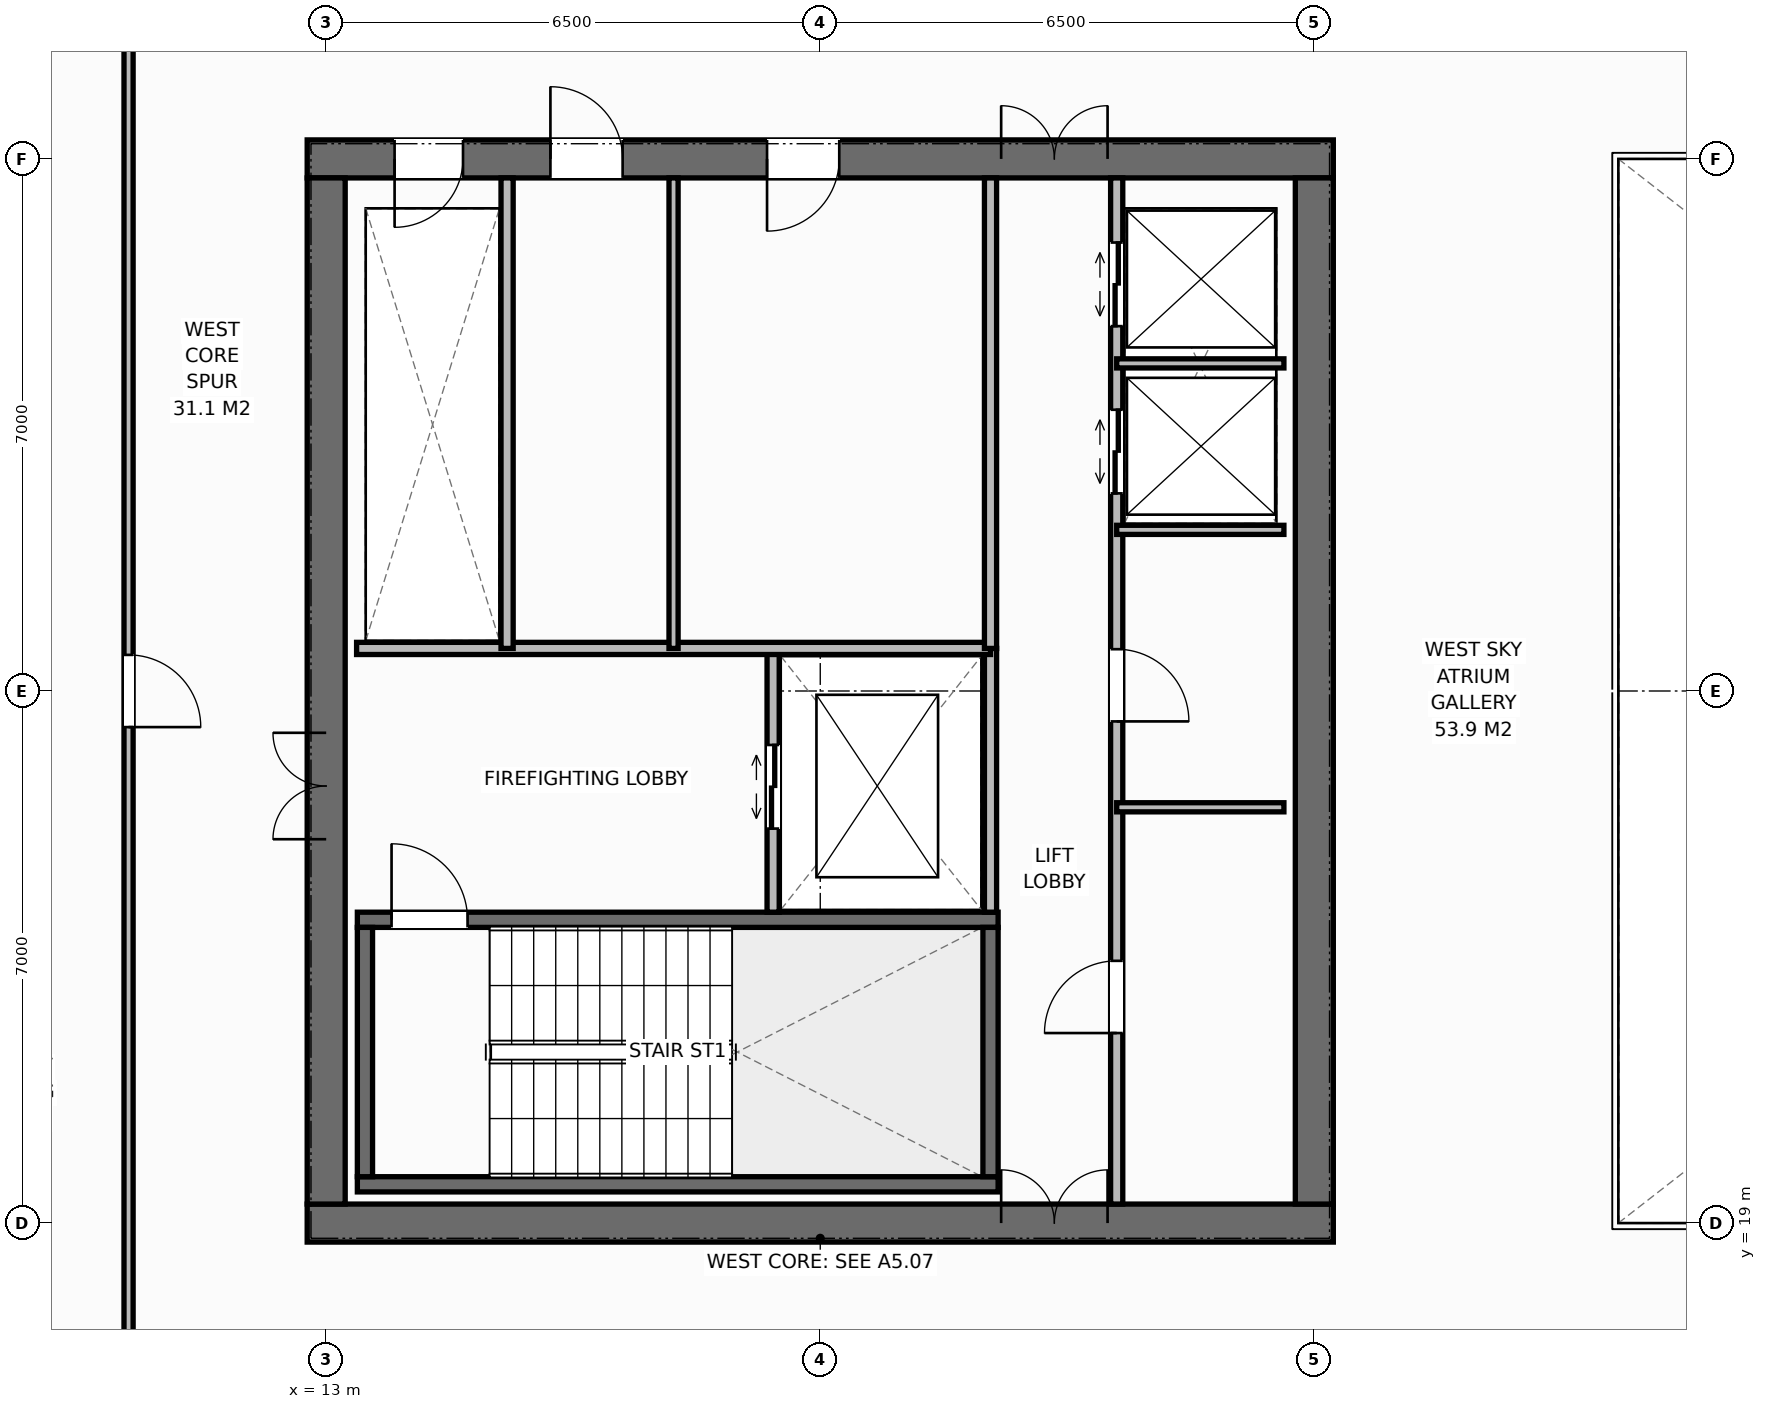
"""IFC4 building model, lengths in metres.
Left out: names, types, materials, properties, quantities, classifications, styles, units other than length and angle.
Written with IfcOpenShell. Run it as: python <this file> out.ifc"""

import sys

from ifc_helpers import new_model, si_unit, direction, frame, frame_2d, origin, place, context, subcontext, project, spatial, rectangle, extrude, element, fill, save


model = new_model("IFC4")
c1 = context("Model", 3, precision=1e-05, world=origin(), true_north=direction((0.0, 1.0)))
c2 = subcontext(c1, "Body", "Model", "MODEL_VIEW")
j1 = project(units=[si_unit("LENGTHUNIT", "METRE"), si_unit("PLANEANGLEUNIT", "RADIAN")], contexts=[c1])
p1 = place(None, origin())
s1 = spatial("IfcSite", under=j1, at=p1, CompositionType="ELEMENT")
p2 = place(p1, origin())
s2 = spatial("IfcBuilding", under=s1, at=p2, CompositionType="ELEMENT")
p3 = place(p2, frame((0.0, 0.0, 302.4)))
s3 = spatial("IfcBuildingStorey", under=s2, at=p3, CompositionType="ELEMENT", Elevation=302.4)
p4 = place(p3, frame((12.75, 19.0, 0.0), z_axis=(0.0, 0.0, 1.0), x_axis=(1.0, 0.0, 0.0)))
e1 = element("IfcWall", 1, at=p4, inside=s3, PredefinedType="SHEAR", context=c2, shape_type="SweptSolid", body=[
    extrude(rectangle(XDim=13.5, YDim=0.5, at=frame_2d((6.75, 0.0))), origin(), (0.0, 0.0, 1.0), 4.0),
])
p5 = place(p4, frame((9.13, 0.0, 0.0)))
e2 = element("IfcOpeningElement", 2, at=p5, cuts=e1, PredefinedType="OPENING", context=c2, shape_type="SweptSolid", body=[
    extrude(rectangle(XDim=1.4, YDim=2.2, at=frame_2d((0.7, 1.1))), frame((0.0, 0.26, 0.0), z_axis=(0.0, -1.0, 0.0), x_axis=(1.0, 0.0, 0.0)), (0.0, 0.0, 1.0), 0.52),
])
p6 = place(p3, frame((12.75, 33.0, 0.0), z_axis=(0.0, 0.0, 1.0), x_axis=(1.0, 0.0, 0.0)))
e3 = element("IfcWall", 3, at=p6, inside=s3, PredefinedType="SHEAR", context=c2, shape_type="SweptSolid", body=[
    extrude(rectangle(XDim=13.5, YDim=0.5, at=frame_2d((6.75, 0.0))), origin(), (0.0, 0.0, 1.0), 4.0),
])
p7 = place(p6, frame((1.15, 0.0, 0.0)))
e4 = element("IfcOpeningElement", 4, at=p7, cuts=e3, PredefinedType="OPENING", context=c2, shape_type="SweptSolid", body=[
    extrude(rectangle(XDim=0.9, YDim=2.15, at=frame_2d((0.45, 1.075))), frame((0.0, 0.26, 0.0), z_axis=(0.0, -1.0, 0.0), x_axis=(1.0, 0.0, 0.0)), (0.0, 0.0, 1.0), 0.52),
])
p8 = place(p6, frame((3.2, 0.0, 0.0)))
e5 = element("IfcOpeningElement", 5, at=p8, cuts=e3, PredefinedType="OPENING", context=c2, shape_type="SweptSolid", body=[
    extrude(rectangle(XDim=0.95, YDim=2.15, at=frame_2d((0.475, 1.075))), frame((0.0, 0.26, 0.0), z_axis=(0.0, -1.0, 0.0), x_axis=(1.0, 0.0, 0.0)), (0.0, 0.0, 1.0), 0.52),
])
p9 = place(p6, frame((6.05, 0.0, 0.0)))
e6 = element("IfcOpeningElement", 6, at=p9, cuts=e3, PredefinedType="OPENING", context=c2, shape_type="SweptSolid", body=[
    extrude(rectangle(XDim=0.95, YDim=2.15, at=frame_2d((0.475, 1.075))), frame((0.0, 0.26, 0.0), z_axis=(0.0, -1.0, 0.0), x_axis=(1.0, 0.0, 0.0)), (0.0, 0.0, 1.0), 0.52),
])
p10 = place(p6, frame((9.13, 0.0, 0.0)))
e7 = element("IfcOpeningElement", 7, at=p10, cuts=e3, PredefinedType="OPENING", context=c2, shape_type="SweptSolid", body=[
    extrude(rectangle(XDim=1.4, YDim=2.2, at=frame_2d((0.7, 1.1))), frame((0.0, 0.26, 0.0), z_axis=(0.0, -1.0, 0.0), x_axis=(1.0, 0.0, 0.0)), (0.0, 0.0, 1.0), 0.52),
])
p11 = place(p3, frame((13.0, 19.25, 0.0), z_axis=(0.0, 0.0, 1.0), x_axis=(0.0, 1.0, 0.0)))
e8 = element("IfcWall", 8, at=p11, inside=s3, PredefinedType="SHEAR", context=c2, shape_type="SweptSolid", body=[
    extrude(rectangle(XDim=13.5, YDim=0.5, at=frame_2d((6.75, 0.0))), origin(), (0.0, 0.0, 1.0), 4.0),
])
p12 = place(p11, frame((4.8, 0.0, 0.0)))
e9 = element("IfcOpeningElement", 9, at=p12, cuts=e8, PredefinedType="OPENING", context=c2, shape_type="SweptSolid", body=[
    extrude(rectangle(XDim=1.4, YDim=2.2, at=frame_2d((0.7, 1.1))), frame((0.0, 0.26, 0.0), z_axis=(0.0, -1.0, 0.0), x_axis=(1.0, 0.0, 0.0)), (0.0, 0.0, 1.0), 0.52),
])
p13 = place(p3, frame((26.0, 19.25, 0.0), z_axis=(0.0, 0.0, 1.0), x_axis=(0.0, 1.0, 0.0)))
e10 = element("IfcWall", 10, at=p13, inside=s3, PredefinedType="SHEAR", context=c2, shape_type="SweptSolid", body=[
    extrude(rectangle(XDim=13.5, YDim=0.5, at=frame_2d((6.75, 0.0))), origin(), (0.0, 0.0, 1.0), 4.0),
])
p14 = place(p3, frame((13.41, 19.51, 0.0), z_axis=(0.0, 0.0, 1.0), x_axis=(1.0, 0.0, 0.0)))
e11 = element("IfcWall", 11, at=p14, inside=s3, PredefinedType="SHEAR", context=c2, shape_type="SweptSolid", body=[
    extrude(rectangle(XDim=8.43, YDim=0.2, at=frame_2d((4.215, 0.0))), origin(), (0.0, 0.0, 1.0), 4.0),
])
p15 = place(p3, frame((13.41, 22.99, 0.0), z_axis=(0.0, 0.0, 1.0), x_axis=(1.0, 0.0, 0.0)))
e12 = element("IfcWall", 12, at=p15, inside=s3, PredefinedType="SHEAR", context=c2, shape_type="SweptSolid", body=[
    extrude(rectangle(XDim=8.43, YDim=0.2, at=frame_2d((4.215, 0.0))), origin(), (0.0, 0.0, 1.0), 4.0),
])
p16 = place(p15, frame((0.45, 0.0, 0.0)))
e13 = element("IfcOpeningElement", 13, at=p16, cuts=e12, PredefinedType="OPENING", context=c2, shape_type="SweptSolid", body=[
    extrude(rectangle(XDim=1.0, YDim=2.15, at=frame_2d((0.5, 1.075))), frame((0.0, 0.11, 0.0), z_axis=(0.0, -1.0, 0.0), x_axis=(1.0, 0.0, 0.0)), (0.0, 0.0, 1.0), 0.22),
])
for number, where, z_axis, x_axis in (
    (14, (13.51, 19.61, 0.0), (0.0, 0.0, 1.0), (0.0, 1.0, 0.0)),
    (15, (21.74, 19.61, 0.0), (0.0, 0.0, 1.0), (0.0, 1.0, 0.0)),
):
    element("IfcWall", number, at=place(p3, frame(where, z_axis=z_axis, x_axis=x_axis)), inside=s3, PredefinedType="SHEAR", context=c2, shape_type="SweptSolid", body=[
        extrude(rectangle(XDim=3.28, YDim=0.2, at=frame_2d((1.64, 0.0))), origin(), (0.0, 0.0, 1.0), 4.0),
    ])
p17 = place(p3, frame((21.74, 23.09, 0.0), z_axis=(0.0, 0.0, 1.0), x_axis=(0.0, 1.0, 0.0)))
e16 = element("IfcWall", 16, at=p17, inside=s3, PredefinedType="STANDARD", context=c2, shape_type="SweptSolid", body=[
    extrude(rectangle(XDim=3.47, YDim=0.16, at=frame_2d((1.735, 0.0))), origin(), (0.0, 0.0, 1.0), 3.788),
])
p18 = place(p3, frame((18.88, 23.09, 0.0), z_axis=(0.0, 0.0, 1.0), x_axis=(0.0, 1.0, 0.0)))
e17 = element("IfcWall", 17, at=p18, inside=s3, PredefinedType="STANDARD", context=c2, shape_type="SweptSolid", body=[
    extrude(rectangle(XDim=3.47, YDim=0.16, at=frame_2d((1.735, 0.0))), origin(), (0.0, 0.0, 1.0), 3.788),
])
p19 = place(p18, frame((1.1, 0.0, 0.0)))
e18 = element("IfcOpeningElement", 18, at=p19, cuts=e17, PredefinedType="OPENING", context=c2, shape_type="SweptSolid", body=[
    extrude(rectangle(XDim=1.1, YDim=2.2, at=frame_2d((0.55, 1.1))), frame((0.0, 0.09, 0.0), z_axis=(0.0, -1.0, 0.0), x_axis=(1.0, 0.0, 0.0)), (0.0, 0.0, 1.0), 0.18),
])
p20 = place(p3, frame((13.4, 26.56, 0.0), z_axis=(0.0, 0.0, 1.0), x_axis=(1.0, 0.0, 0.0)))
e19 = element("IfcWall", 19, at=p20, inside=s3, PredefinedType="STANDARD", context=c2, shape_type="SweptSolid", body=[
    extrude(rectangle(XDim=8.34, YDim=0.16, at=frame_2d((4.17, 0.0))), origin(), (0.0, 0.0, 1.0), 3.788),
])
p21 = place(p3, frame((15.38, 26.56, 0.0), z_axis=(0.0, 0.0, 1.0), x_axis=(0.0, 1.0, 0.0)))
e20 = element("IfcWall", 20, at=p21, inside=s3, PredefinedType="STANDARD", context=c2, shape_type="SweptSolid", body=[
    extrude(rectangle(XDim=6.19, YDim=0.16, at=frame_2d((3.095, 0.0))), origin(), (0.0, 0.0, 1.0), 3.788),
])
p22 = place(p3, frame((17.57, 26.56, 0.0), z_axis=(0.0, 0.0, 1.0), x_axis=(0.0, 1.0, 0.0)))
e21 = element("IfcWall", 21, at=p22, inside=s3, PredefinedType="PARTITIONING", context=c2, shape_type="SweptSolid", body=[
    extrude(rectangle(XDim=6.19, YDim=0.12, at=frame_2d((3.095, 0.0))), origin(), (0.0, 0.0, 1.0), 3.788),
])
p23 = place(p3, frame((21.74, 26.56, 0.0), z_axis=(0.0, 0.0, 1.0), x_axis=(0.0, 1.0, 0.0)))
e22 = element("IfcWall", 22, at=p23, inside=s3, PredefinedType="STANDARD", context=c2, shape_type="SweptSolid", body=[
    extrude(rectangle(XDim=6.19, YDim=0.16, at=frame_2d((3.095, 0.0))), origin(), (0.0, 0.0, 1.0), 3.788),
])
p24 = place(p3, frame((23.4, 19.25, 0.0), z_axis=(0.0, 0.0, 1.0), x_axis=(0.0, 1.0, 0.0)))
e23 = element("IfcWall", 23, at=p24, inside=s3, PredefinedType="STANDARD", context=c2, shape_type="SweptSolid", body=[
    extrude(rectangle(XDim=13.5, YDim=0.16, at=frame_2d((6.75, 0.0))), origin(), (0.0, 0.0, 1.0), 3.788),
])
p25 = place(p24, frame((2.25, 0.0, 0.0)))
e24 = element("IfcOpeningElement", 24, at=p25, cuts=e23, PredefinedType="OPENING", context=c2, shape_type="SweptSolid", body=[
    extrude(rectangle(XDim=0.95, YDim=2.15, at=frame_2d((0.475, 1.075))), frame((0.0, 0.09, 0.0), z_axis=(0.0, -1.0, 0.0), x_axis=(1.0, 0.0, 0.0)), (0.0, 0.0, 1.0), 0.18),
])
p26 = place(p24, frame((6.35, 0.0, 0.0)))
e25 = element("IfcOpeningElement", 25, at=p26, cuts=e23, PredefinedType="OPENING", context=c2, shape_type="SweptSolid", body=[
    extrude(rectangle(XDim=0.95, YDim=2.15, at=frame_2d((0.475, 1.075))), frame((0.0, 0.09, 0.0), z_axis=(0.0, -1.0, 0.0), x_axis=(1.0, 0.0, 0.0)), (0.0, 0.0, 1.0), 0.18),
])
p27 = place(p24, frame((9.35, 0.0, 0.0)))
e26 = element("IfcOpeningElement", 26, at=p27, cuts=e23, PredefinedType="OPENING", context=c2, shape_type="SweptSolid", body=[
    extrude(rectangle(XDim=1.1, YDim=2.2, at=frame_2d((0.55, 1.1))), frame((0.0, 0.09, 0.0), z_axis=(0.0, -1.0, 0.0), x_axis=(1.0, 0.0, 0.0)), (0.0, 0.0, 1.0), 0.18),
])
p28 = place(p24, frame((11.55, 0.0, 0.0)))
e27 = element("IfcOpeningElement", 27, at=p28, cuts=e23, PredefinedType="OPENING", context=c2, shape_type="SweptSolid", body=[
    extrude(rectangle(XDim=1.1, YDim=2.2, at=frame_2d((0.55, 1.1))), frame((0.0, 0.09, 0.0), z_axis=(0.0, -1.0, 0.0), x_axis=(1.0, 0.0, 0.0)), (0.0, 0.0, 1.0), 0.18),
])
for number, where, z_axis, x_axis in (
    (28, (23.4, 24.47, 0.0), (0.0, 0.0, 1.0), (1.0, 0.0, 0.0)),
    (29, (23.4, 28.12, 0.0), (0.0, 0.0, 1.0), (1.0, 0.0, 0.0)),
    (30, (23.4, 30.31, 0.0), (0.0, 0.0, 1.0), (1.0, 0.0, 0.0)),
):
    element("IfcWall", number, at=place(p3, frame(where, z_axis=z_axis, x_axis=x_axis)), inside=s3, PredefinedType="PARTITIONING", context=c2, shape_type="SweptSolid", body=[
        extrude(rectangle(XDim=2.2, YDim=0.12, at=frame_2d((1.1, 0.0))), origin(), (0.0, 0.0, 1.0), 3.788),
    ])
p29 = place(p3, frame((10.4, 16.5, 0.0), z_axis=(0.0, 0.0, 1.0), x_axis=(0.0, 1.0, 0.0)))
e31 = element("IfcWall", 31, at=p29, inside=s3, PredefinedType="PARTITIONING", context=c2, shape_type="SweptSolid", body=[
    extrude(rectangle(XDim=19.0, YDim=0.12, at=frame_2d((9.5, 0.0))), origin(), (0.0, 0.0, 1.0), 3.788),
])
p30 = place(p29, frame((9.025, 0.0, 0.0)))
e32 = element("IfcOpeningElement", 32, at=p30, cuts=e31, PredefinedType="OPENING", context=c2, shape_type="SweptSolid", body=[
    extrude(rectangle(XDim=0.95, YDim=2.15, at=frame_2d((0.475, 1.075))), frame((0.0, 0.07, 0.0), z_axis=(0.0, -1.0, 0.0), x_axis=(1.0, 0.0, 0.0)), (0.0, 0.0, 1.0), 0.14),
])
p31 = place(p16, origin())
e33 = element("IfcDoor", 33, at=p31, inside=s3, OperationType="SINGLE_SWING_LEFT", PredefinedType="DOOR", context=c2, shape_type="SweptSolid", body=[
    extrude(rectangle(XDim=1.0, YDim=2.15, at=frame_2d((0.5, 1.075))), frame((0.0, 0.025, 0.0), z_axis=(0.0, -1.0, 0.0), x_axis=(1.0, 0.0, 0.0)), (0.0, 0.0, 1.0), 0.05),
])
fill(e13, e33)
p32 = place(p12, origin())
e34 = element("IfcDoor", 34, at=p32, inside=s3, OperationType="DOUBLE_DOOR_SINGLE_SWING", PredefinedType="DOOR", context=c2, shape_type="SweptSolid", body=[
    extrude(rectangle(XDim=1.4, YDim=2.2, at=frame_2d((0.7, 1.1))), frame((0.0, 0.025, 0.0), z_axis=(0.0, -1.0, 0.0), x_axis=(1.0, 0.0, 0.0)), (0.0, 0.0, 1.0), 0.05),
])
fill(e9, e34)
p33 = place(p19, origin())
e35 = element("IfcDoor", 35, at=p33, inside=s3, OperationType="DOUBLE_DOOR_SLIDING", PredefinedType="DOOR", context=c2, shape_type="SweptSolid", body=[
    extrude(rectangle(XDim=1.1, YDim=2.2, at=frame_2d((0.55, 1.1))), frame((0.0, 0.025, 0.0), z_axis=(0.0, -1.0, 0.0), x_axis=(1.0, 0.0, 0.0)), (0.0, 0.0, 1.0), 0.05),
])
fill(e18, e35)
p34 = place(p7, origin())
e36 = element("IfcDoor", 36, at=p34, inside=s3, OperationType="SINGLE_SWING_RIGHT", PredefinedType="DOOR", context=c2, shape_type="SweptSolid", body=[
    extrude(rectangle(XDim=0.9, YDim=2.15, at=frame_2d((0.45, 1.075))), frame((0.0, -0.025, 0.0), z_axis=(0.0, -1.0, 0.0), x_axis=(1.0, 0.0, 0.0)), (0.0, 0.0, 1.0), 0.05),
])
fill(e4, e36)
p35 = place(p8, origin())
e37 = element("IfcDoor", 37, at=p35, inside=s3, OperationType="SINGLE_SWING_LEFT", PredefinedType="DOOR", context=c2, shape_type="SweptSolid", body=[
    extrude(rectangle(XDim=0.95, YDim=2.15, at=frame_2d((0.475, 1.075))), frame((0.0, -0.025, 0.0), z_axis=(0.0, -1.0, 0.0), x_axis=(1.0, 0.0, 0.0)), (0.0, 0.0, 1.0), 0.05),
])
fill(e5, e37)
p36 = place(p9, origin())
e38 = element("IfcDoor", 38, at=p36, inside=s3, OperationType="SINGLE_SWING_RIGHT", PredefinedType="DOOR", context=c2, shape_type="SweptSolid", body=[
    extrude(rectangle(XDim=0.95, YDim=2.15, at=frame_2d((0.475, 1.075))), frame((0.0, -0.025, 0.0), z_axis=(0.0, -1.0, 0.0), x_axis=(1.0, 0.0, 0.0)), (0.0, 0.0, 1.0), 0.05),
])
fill(e6, e38)
p37 = place(p5, origin())
e39 = element("IfcDoor", 39, at=p37, inside=s3, OperationType="DOUBLE_DOOR_SINGLE_SWING", PredefinedType="DOOR", context=c2, shape_type="SweptSolid", body=[
    extrude(rectangle(XDim=1.4, YDim=2.2, at=frame_2d((0.7, 1.1))), frame((0.0, 0.075, 0.0), z_axis=(0.0, -1.0, 0.0), x_axis=(1.0, 0.0, 0.0)), (0.0, 0.0, 1.0), 0.05),
])
fill(e2, e39)
p38 = place(p10, origin())
e40 = element("IfcDoor", 40, at=p38, inside=s3, OperationType="DOUBLE_DOOR_SINGLE_SWING", PredefinedType="DOOR", context=c2, shape_type="SweptSolid", body=[
    extrude(rectangle(XDim=1.4, YDim=2.2, at=frame_2d((0.7, 1.1))), frame((0.0, -0.025, 0.0), z_axis=(0.0, -1.0, 0.0), x_axis=(1.0, 0.0, 0.0)), (0.0, 0.0, 1.0), 0.05),
])
fill(e7, e40)
p39 = place(p25, origin())
e41 = element("IfcDoor", 41, at=p39, inside=s3, OperationType="SINGLE_SWING_LEFT", PredefinedType="DOOR", context=c2, shape_type="SweptSolid", body=[
    extrude(rectangle(XDim=0.95, YDim=2.15, at=frame_2d((0.475, 1.075))), frame((0.0, 0.025, 0.0), z_axis=(0.0, -1.0, 0.0), x_axis=(1.0, 0.0, 0.0)), (0.0, 0.0, 1.0), 0.05),
])
fill(e24, e41)
p40 = place(p26, origin())
e42 = element("IfcDoor", 42, at=p40, inside=s3, OperationType="SINGLE_SWING_RIGHT", PredefinedType="DOOR", context=c2, shape_type="SweptSolid", body=[
    extrude(rectangle(XDim=0.95, YDim=2.15, at=frame_2d((0.475, 1.075))), frame((0.0, 0.025, 0.0), z_axis=(0.0, -1.0, 0.0), x_axis=(1.0, 0.0, 0.0)), (0.0, 0.0, 1.0), 0.05),
])
fill(e25, e42)
p41 = place(p27, origin())
e43 = element("IfcDoor", 43, at=p41, inside=s3, OperationType="DOUBLE_DOOR_SLIDING", PredefinedType="DOOR", context=c2, shape_type="SweptSolid", body=[
    extrude(rectangle(XDim=1.1, YDim=2.2, at=frame_2d((0.55, 1.1))), frame((0.0, 0.025, 0.0), z_axis=(0.0, -1.0, 0.0), x_axis=(1.0, 0.0, 0.0)), (0.0, 0.0, 1.0), 0.05),
])
fill(e26, e43)
p42 = place(p28, origin())
e44 = element("IfcDoor", 44, at=p42, inside=s3, OperationType="DOUBLE_DOOR_SLIDING", PredefinedType="DOOR", context=c2, shape_type="SweptSolid", body=[
    extrude(rectangle(XDim=1.1, YDim=2.2, at=frame_2d((0.55, 1.1))), frame((0.0, 0.025, 0.0), z_axis=(0.0, -1.0, 0.0), x_axis=(1.0, 0.0, 0.0)), (0.0, 0.0, 1.0), 0.05),
])
fill(e27, e44)
p43 = place(p30, origin())
e45 = element("IfcDoor", 45, at=p43, inside=s3, OperationType="SINGLE_SWING_RIGHT", PredefinedType="DOOR", context=c2, shape_type="SweptSolid", body=[
    extrude(rectangle(XDim=0.95, YDim=2.15, at=frame_2d((0.475, 1.075))), frame((0.0, 0.025, 0.0), z_axis=(0.0, -1.0, 0.0), x_axis=(1.0, 0.0, 0.0)), (0.0, 0.0, 1.0), 0.05),
])
fill(e32, e45)
save(model, sys.argv[1])
